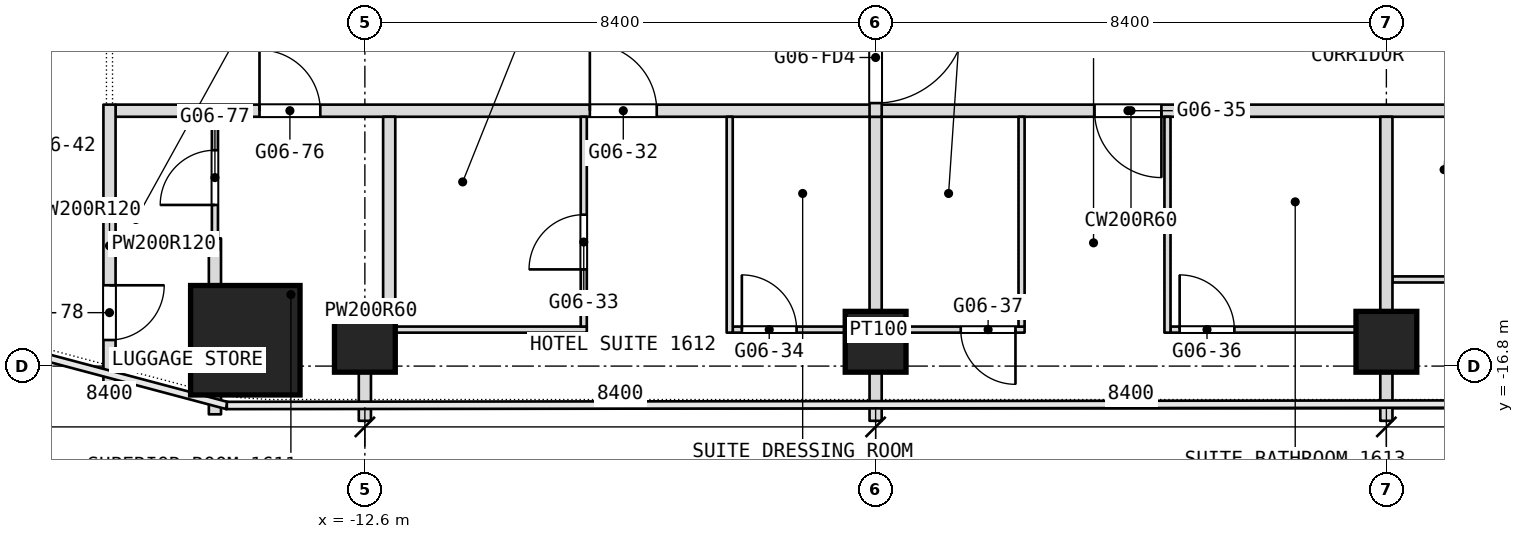
"""IFC4 building model, lengths in metres.
Left out: names, types, materials, properties, quantities, classifications, styles, units other than length and angle.
Written with IfcOpenShell. Run it as: python <this file> out.ifc"""

import sys

from ifc_helpers import new_model, si_unit, direction, frame, frame_2d, origin, origin_2d, place, context, subcontext, project, spatial, rectangle, extrude, element, fill, save


model = new_model("IFC4")
c1 = context("Model", 3, precision=1e-05, world=origin(), true_north=direction((0.0, 1.0)))
c2 = subcontext(c1, "Body", "Model", "MODEL_VIEW")
j1 = project(units=[si_unit("LENGTHUNIT", "METRE"), si_unit("PLANEANGLEUNIT", "RADIAN")], contexts=[c1])
p1 = place(None, origin())
s1 = spatial("IfcSite", under=j1, at=p1, CompositionType="ELEMENT")
p2 = place(p1, origin())
s2 = spatial("IfcBuilding", under=s1, at=p2, CompositionType="ELEMENT")
p3 = place(p2, frame((0.0, 0.0, 72.5)))
s3 = spatial("IfcBuildingStorey", under=s2, at=p3, CompositionType="ELEMENT", Elevation=72.5)
p4 = place(p3, frame((-14.566, -16.375, 0.0), z_axis=(0.0, 0.0, 1.0), x_axis=(1.0, 0.0, 0.0)))
e1 = element("IfcColumn", 1, at=p4, inside=s3, PredefinedType="COLUMN", context=c2, shape_type="SweptSolid", body=[
    extrude(rectangle(XDim=1.8, YDim=1.8, at=origin_2d()), origin(), (0.0, 0.0, 1.0), 3.6),
])
for number, where, z_axis, x_axis in (
    (2, (4.2, -16.4, 0.0), (0.0, 0.0, 1.0), (1.0, 0.0, 0.0)),
    (3, (-4.2, -16.4, 0.0), (0.0, 0.0, 1.0), (1.0, 0.0, 0.0)),
    (4, (-12.6, -16.4, 0.0), (0.0, 0.0, 1.0), (1.0, 0.0, 0.0)),
):
    element("IfcColumn", number, at=place(p3, frame(where, z_axis=z_axis, x_axis=x_axis)), inside=s3, PredefinedType="COLUMN", context=c2, shape_type="SweptSolid", body=[
        extrude(rectangle(XDim=1.0, YDim=1.0, at=origin_2d()), origin(), (0.0, 0.0, 1.0), 3.6),
    ])
p5 = place(p3, frame((-12.5, -16.2, 0.0), z_axis=(0.0, 0.0, 1.0), x_axis=(1.0, 0.0, 0.0)))
e5 = element("IfcWall", 5, at=p5, inside=s3, PredefinedType="PARTITIONING", context=c2, shape_type="SweptSolid", body=[
    extrude(rectangle(XDim=3.55, YDim=0.1, at=frame_2d((1.775, 0.0))), origin(), (0.0, 0.0, 1.0), 2.94),
])
p6 = place(p3, frame((-6.55, -16.2, 0.0), z_axis=(0.0, 0.0, 1.0), x_axis=(1.0, 0.0, 0.0)))
e6 = element("IfcWall", 6, at=p6, inside=s3, PredefinedType="PARTITIONING", context=c2, shape_type="SweptSolid", body=[
    extrude(rectangle(XDim=4.8, YDim=0.1, at=frame_2d((2.4, 0.0))), origin(), (0.0, 0.0, 1.0), 2.94),
])
p7 = place(p6, frame((0.15, 0.0, 0.0)))
e7 = element("IfcOpeningElement", 7, at=p7, cuts=e6, PredefinedType="OPENING", context=c2, shape_type="SweptSolid", body=[
    extrude(rectangle(XDim=0.9, YDim=2.1, at=frame_2d((0.45, 1.05))), frame((0.0, 0.05, 0.0), z_axis=(0.0, -1.0, 0.0), x_axis=(1.0, 0.0, 0.0)), (0.0, 0.0, 1.0), 0.1),
])
p8 = place(p6, frame((3.75, 0.0, 0.0)))
e8 = element("IfcOpeningElement", 8, at=p8, cuts=e6, PredefinedType="OPENING", context=c2, shape_type="SweptSolid", body=[
    extrude(rectangle(XDim=0.9, YDim=2.1, at=frame_2d((0.45, 1.05))), frame((0.0, 0.05, 0.0), z_axis=(0.0, -1.0, 0.0), x_axis=(1.0, 0.0, 0.0)), (0.0, 0.0, 1.0), 0.1),
])
p9 = place(p3, frame((0.65, -16.2, 0.0), z_axis=(0.0, 0.0, 1.0), x_axis=(1.0, 0.0, 0.0)))
e9 = element("IfcWall", 9, at=p9, inside=s3, PredefinedType="PARTITIONING", context=c2, shape_type="SweptSolid", body=[
    extrude(rectangle(XDim=3.65, YDim=0.1, at=frame_2d((1.825, 0.0))), origin(), (0.0, 0.0, 1.0), 2.94),
])
p10 = place(p9, frame((0.15, 0.0, 0.0)))
e10 = element("IfcOpeningElement", 10, at=p10, cuts=e9, PredefinedType="OPENING", context=c2, shape_type="SweptSolid", body=[
    extrude(rectangle(XDim=0.9, YDim=2.1, at=frame_2d((0.45, 1.05))), frame((0.0, 0.05, 0.0), z_axis=(0.0, -1.0, 0.0), x_axis=(1.0, 0.0, 0.0)), (0.0, 0.0, 1.0), 0.1),
])
p11 = place(p3, frame((-12.7, -15.9, 0.0), z_axis=(0.0, 0.0, 1.0), x_axis=(1.0, 0.0, 0.0)))
e11 = element("IfcWall", 11, at=p11, inside=s3, PredefinedType="PARTITIONING", context=c2, shape_type="SweptSolid", body=[
    extrude(rectangle(XDim=0.4, YDim=0.2, at=frame_2d((0.2, 0.0))), origin(), (0.0, 0.0, 1.0), 3.34),
])
p12 = place(p3, frame((4.3, -15.375, 0.0), z_axis=(0.0, 0.0, 1.0), x_axis=(1.0, 0.0, 0.0)))
e12 = element("IfcWall", 12, at=p12, inside=s3, PredefinedType="PARTITIONING", context=c2, shape_type="SweptSolid", body=[
    extrude(rectangle(XDim=2.35, YDim=0.1, at=frame_2d((1.175, 0.0))), origin(), (0.0, 0.0, 1.0), 3.34),
])
p13 = place(p12, frame((1.3, 0.0, 0.0)))
e13 = element("IfcOpeningElement", 13, at=p13, cuts=e12, PredefinedType="OPENING", context=c2, shape_type="SweptSolid", body=[
    extrude(rectangle(XDim=0.9, YDim=2.1, at=frame_2d((0.45, 1.05))), frame((0.0, 0.05, 0.0), z_axis=(0.0, -1.0, 0.0), x_axis=(1.0, 0.0, 0.0)), (0.0, 0.0, 1.0), 0.1),
])
p14 = place(p3, frame((-16.7, -14.8, 0.0), z_axis=(0.0, 0.0, 1.0), x_axis=(1.0, 0.0, 0.0)))
e14 = element("IfcWall", 14, at=p14, inside=s3, PredefinedType="PARTITIONING", context=c2, shape_type="SweptSolid", body=[
    extrude(rectangle(XDim=1.584, YDim=0.2, at=frame_2d((0.792, 0.0))), origin(), (0.0, 0.0, 1.0), 3.34),
])
p15 = place(p3, frame((-16.7, -12.6, 0.0), z_axis=(0.0, 0.0, 1.0), x_axis=(1.0, 0.0, 0.0)))
e15 = element("IfcWall", 15, at=p15, inside=s3, PredefinedType="PARTITIONING", context=c2, shape_type="SweptSolid", body=[
    extrude(rectangle(XDim=33.4, YDim=0.2, at=frame_2d((16.7, 0.0))), origin(), (0.0, 0.0, 1.0), 3.34),
])
p16 = place(p15, frame((7.8, 0.0, 0.0)))
e16 = element("IfcOpeningElement", 16, at=p16, cuts=e15, PredefinedType="OPENING", context=c2, shape_type="SweptSolid", body=[
    extrude(rectangle(XDim=1.1, YDim=2.1, at=frame_2d((0.55, 1.05))), frame((0.0, 0.1, 0.0), z_axis=(0.0, -1.0, 0.0), x_axis=(1.0, 0.0, 0.0)), (0.0, 0.0, 1.0), 0.2),
])
p17 = place(p15, frame((16.1, 0.0, 0.0)))
e17 = element("IfcOpeningElement", 17, at=p17, cuts=e15, PredefinedType="OPENING", context=c2, shape_type="SweptSolid", body=[
    extrude(rectangle(XDim=1.1, YDim=2.1, at=frame_2d((0.55, 1.05))), frame((0.0, 0.1, 0.0), z_axis=(0.0, -1.0, 0.0), x_axis=(1.0, 0.0, 0.0)), (0.0, 0.0, 1.0), 0.2),
])
p18 = place(p15, frame((23.7, 0.0, 0.0)))
e18 = element("IfcOpeningElement", 18, at=p18, cuts=e15, PredefinedType="OPENING", context=c2, shape_type="SweptSolid", body=[
    extrude(rectangle(XDim=1.0, YDim=2.1, at=frame_2d((0.5, 1.05))), frame((0.0, 0.1, 0.0), z_axis=(0.0, -1.0, 0.0), x_axis=(1.0, 0.0, 0.0)), (0.0, 0.0, 1.0), 0.2),
])
p19 = place(p15, frame((25.5, 0.0, 0.0)))
e19 = element("IfcOpeningElement", 19, at=p19, cuts=e15, PredefinedType="OPENING", context=c2, shape_type="SweptSolid", body=[
    extrude(rectangle(XDim=1.0, YDim=2.1, at=frame_2d((0.5, 1.05))), frame((0.0, 0.1, 0.0), z_axis=(0.0, -1.0, 0.0), x_axis=(1.0, 0.0, 0.0)), (0.0, 0.0, 1.0), 0.2),
])
p20 = place(p15, frame((2.367, 0.0, 0.0)))
e20 = element("IfcOpeningElement", 20, at=p20, cuts=e15, PredefinedType="OPENING", context=c2, shape_type="SweptSolid", body=[
    extrude(rectangle(XDim=1.0, YDim=2.1, at=frame_2d((0.5, 1.05))), frame((0.0, 0.1, 0.0), z_axis=(0.0, -1.0, 0.0), x_axis=(1.0, 0.0, 0.0)), (0.0, 0.0, 1.0), 0.2),
])
p21 = place(p15, frame((30.083, 0.0, 0.0)))
e21 = element("IfcOpeningElement", 21, at=p21, cuts=e15, PredefinedType="OPENING", context=c2, shape_type="SweptSolid", body=[
    extrude(rectangle(XDim=1.0, YDim=2.1, at=frame_2d((0.5, 1.05))), frame((0.0, 0.1, 0.0), z_axis=(0.0, -1.0, 0.0), x_axis=(1.0, 0.0, 0.0)), (0.0, 0.0, 1.0), 0.2),
])
p22 = place(p3, frame((4.2, -17.7, 0.0), z_axis=(0.0, 0.0, 1.0), x_axis=(0.0, 1.0, 0.0)))
e22 = element("IfcWall", 22, at=p22, inside=s3, PredefinedType="PARTITIONING", context=c2, shape_type="SweptSolid", body=[
    extrude(rectangle(XDim=5.0, YDim=0.2, at=frame_2d((2.5, 0.0))), origin(), (0.0, 0.0, 1.0), 3.34),
])
p23 = place(p3, frame((0.6, -16.25, 0.0), z_axis=(0.0, 0.0, 1.0), x_axis=(0.0, 1.0, 0.0)))
e23 = element("IfcWall", 23, at=p23, inside=s3, PredefinedType="PARTITIONING", context=c2, shape_type="SweptSolid", body=[
    extrude(rectangle(XDim=3.55, YDim=0.1, at=frame_2d((1.775, 0.0))), origin(), (0.0, 0.0, 1.0), 3.34),
])
p24 = place(p3, frame((-1.8, -16.15, 0.0), z_axis=(0.0, 0.0, 1.0), x_axis=(0.0, 1.0, 0.0)))
e24 = element("IfcWall", 24, at=p24, inside=s3, PredefinedType="PARTITIONING", context=c2, shape_type="SweptSolid", body=[
    extrude(rectangle(XDim=3.45, YDim=0.1, at=frame_2d((1.725, 0.0))), origin(), (0.0, 0.0, 1.0), 3.34),
])
p25 = place(p3, frame((-4.2, -17.7, 0.0), z_axis=(0.0, 0.0, 1.0), x_axis=(0.0, 1.0, 0.0)))
e25 = element("IfcWall", 25, at=p25, inside=s3, PredefinedType="PARTITIONING", context=c2, shape_type="SweptSolid", body=[
    extrude(rectangle(XDim=5.0, YDim=0.2, at=frame_2d((2.5, 0.0))), origin(), (0.0, 0.0, 1.0), 3.34),
])
p26 = place(p3, frame((-4.2, -12.7, 0.0), z_axis=(0.0, 0.0, 1.0), x_axis=(0.0, 1.0, 0.0)))
e26 = element("IfcWall", 26, at=p26, inside=s3, PredefinedType="PARTITIONING", context=c2, shape_type="SweptSolid", body=[
    extrude(rectangle(XDim=12.7, YDim=0.2, at=frame_2d((6.35, 0.0))), origin(), (0.0, 0.0, 1.0), 3.34),
])
p27 = place(p26, frame((11.05, 0.0, 0.0)))
e27 = element("IfcOpeningElement", 27, at=p27, cuts=e26, PredefinedType="OPENING", context=c2, shape_type="SweptSolid", body=[
    extrude(rectangle(XDim=1.5, YDim=2.1, at=frame_2d((0.75, 1.05))), frame((0.0, 0.1, 0.0), z_axis=(0.0, -1.0, 0.0), x_axis=(1.0, 0.0, 0.0)), (0.0, 0.0, 1.0), 0.2),
])
p28 = place(p26, frame((0.225, 0.0, 0.0)))
e28 = element("IfcOpeningElement", 28, at=p28, cuts=e26, PredefinedType="OPENING", context=c2, shape_type="SweptSolid", body=[
    extrude(rectangle(XDim=1.5, YDim=2.1, at=frame_2d((0.75, 1.05))), frame((0.0, 0.1, 0.0), z_axis=(0.0, -1.0, 0.0), x_axis=(1.0, 0.0, 0.0)), (0.0, 0.0, 1.0), 0.2),
])
p29 = place(p3, frame((-6.6, -16.25, 0.0), z_axis=(0.0, 0.0, 1.0), x_axis=(0.0, 1.0, 0.0)))
e29 = element("IfcWall", 29, at=p29, inside=s3, PredefinedType="PARTITIONING", context=c2, shape_type="SweptSolid", body=[
    extrude(rectangle(XDim=3.55, YDim=0.1, at=frame_2d((1.775, 0.0))), origin(), (0.0, 0.0, 1.0), 3.34),
])
p30 = place(p3, frame((-9.0, -16.15, 0.0), z_axis=(0.0, 0.0, 1.0), x_axis=(0.0, 1.0, 0.0)))
e30 = element("IfcWall", 30, at=p30, inside=s3, PredefinedType="PARTITIONING", context=c2, shape_type="SweptSolid", body=[
    extrude(rectangle(XDim=3.45, YDim=0.1, at=frame_2d((1.725, 0.0))), origin(), (0.0, 0.0, 1.0), 3.34),
])
p31 = place(p30, frame((0.94, 0.0, 0.0)))
e31 = element("IfcOpeningElement", 31, at=p31, cuts=e30, PredefinedType="OPENING", context=c2, shape_type="SweptSolid", body=[
    extrude(rectangle(XDim=0.9, YDim=2.1, at=frame_2d((0.45, 1.05))), frame((0.0, 0.05, 0.0), z_axis=(0.0, -1.0, 0.0), x_axis=(1.0, 0.0, 0.0)), (0.0, 0.0, 1.0), 0.1),
])
p32 = place(p3, frame((-12.2, -16.0, 0.0), z_axis=(0.0, 0.0, 1.0), x_axis=(0.0, 1.0, 0.0)))
e32 = element("IfcWall", 32, at=p32, inside=s3, PredefinedType="PARTITIONING", context=c2, shape_type="SweptSolid", body=[
    extrude(rectangle(XDim=3.3, YDim=0.2, at=frame_2d((1.65, 0.0))), origin(), (0.0, 0.0, 1.0), 3.34),
])
p33 = place(p3, frame((-12.6, -17.7, 0.0), z_axis=(0.0, 0.0, 1.0), x_axis=(0.0, 1.0, 0.0)))
e33 = element("IfcWall", 33, at=p33, inside=s3, PredefinedType="PARTITIONING", context=c2, shape_type="SweptSolid", body=[
    extrude(rectangle(XDim=1.7, YDim=0.2, at=frame_2d((0.85, 0.0))), origin(), (0.0, 0.0, 1.0), 3.34),
])
p34 = place(p3, frame((-15.066, -17.593, 0.0), z_axis=(0.0, 0.0, 1.0), x_axis=(0.0, 1.0, 0.0)))
e34 = element("IfcWall", 34, at=p34, inside=s3, PredefinedType="PARTITIONING", context=c2, shape_type="SweptSolid", body=[
    extrude(rectangle(XDim=0.318, YDim=0.2, at=frame_2d((0.159, 0.0))), origin(), (0.0, 0.0, 1.0), 3.34),
])
p35 = place(p3, frame((-15.066, -15.475, 0.0), z_axis=(0.0, 0.0, 1.0), x_axis=(0.0, 1.0, 0.0)))
e35 = element("IfcWall", 35, at=p35, inside=s3, PredefinedType="PARTITIONING", context=c2, shape_type="SweptSolid", body=[
    extrude(rectangle(XDim=0.775, YDim=0.2, at=frame_2d((0.388, 0.0))), origin(), (0.0, 0.0, 1.0), 3.34),
])
p36 = place(p3, frame((-15.066, -14.9, 0.0), z_axis=(0.0, 0.0, 1.0), x_axis=(0.0, 1.0, 0.0)))
e36 = element("IfcWall", 36, at=p36, inside=s3, PredefinedType="PARTITIONING", context=c2, shape_type="SweptSolid", body=[
    extrude(rectangle(XDim=2.2, YDim=0.1, at=frame_2d((1.1, 0.0))), origin(), (0.0, 0.0, 1.0), 3.34),
])
p37 = place(p36, frame((0.75, 0.0, 0.0)))
e37 = element("IfcOpeningElement", 37, at=p37, cuts=e36, PredefinedType="OPENING", context=c2, shape_type="SweptSolid", body=[
    extrude(rectangle(XDim=0.9, YDim=2.1, at=frame_2d((0.45, 1.05))), frame((0.0, 0.05, 0.0), z_axis=(0.0, -1.0, 0.0), x_axis=(1.0, 0.0, 0.0)), (0.0, 0.0, 1.0), 0.1),
])
p38 = place(p3, frame((-16.8, -17.143, 0.0), z_axis=(0.0, 0.0, 1.0), x_axis=(0.0, 1.0, 0.0)))
e38 = element("IfcWall", 38, at=p38, inside=s3, PredefinedType="PARTITIONING", context=c2, shape_type="SweptSolid", body=[
    extrude(rectangle(XDim=4.643, YDim=0.2, at=frame_2d((2.322, 0.0))), origin(), (0.0, 0.0, 1.0), 3.34),
])
p39 = place(p38, frame((0.772, 0.0, 0.0)))
e39 = element("IfcOpeningElement", 39, at=p39, cuts=e38, PredefinedType="OPENING", context=c2, shape_type="SweptSolid", body=[
    extrude(rectangle(XDim=0.9, YDim=2.1, at=frame_2d((0.45, 1.05))), frame((0.0, 0.1, 0.0), z_axis=(0.0, -1.0, 0.0), x_axis=(1.0, 0.0, 0.0)), (0.0, 0.0, 1.0), 0.2),
])
p40 = place(p7, origin())
e40 = element("IfcDoor", 40, at=p40, inside=s3, OperationType="SINGLE_SWING_LEFT", PredefinedType="DOOR", context=c2, shape_type="SweptSolid", body=[
    extrude(rectangle(XDim=0.9, YDim=2.1, at=frame_2d((0.45, 1.05))), frame((0.0, 0.025, 0.0), z_axis=(0.0, -1.0, 0.0), x_axis=(1.0, 0.0, 0.0)), (0.0, 0.0, 1.0), 0.05),
])
fill(e7, e40)
p41 = place(p8, origin())
e41 = element("IfcDoor", 41, at=p41, inside=s3, OperationType="SINGLE_SWING_RIGHT", PredefinedType="DOOR", context=c2, shape_type="SweptSolid", body=[
    extrude(rectangle(XDim=0.9, YDim=2.1, at=frame_2d((0.45, 1.05))), frame((0.0, 0.025, 0.0), z_axis=(0.0, -1.0, 0.0), x_axis=(1.0, 0.0, 0.0)), (0.0, 0.0, 1.0), 0.05),
])
fill(e8, e41)
p42 = place(p10, origin())
e42 = element("IfcDoor", 42, at=p42, inside=s3, OperationType="SINGLE_SWING_LEFT", PredefinedType="DOOR", context=c2, shape_type="SweptSolid", body=[
    extrude(rectangle(XDim=0.9, YDim=2.1, at=frame_2d((0.45, 1.05))), frame((0.0, 0.025, 0.0), z_axis=(0.0, -1.0, 0.0), x_axis=(1.0, 0.0, 0.0)), (0.0, 0.0, 1.0), 0.05),
])
fill(e10, e42)
p43 = place(p16, origin())
e43 = element("IfcDoor", 43, at=p43, inside=s3, OperationType="SINGLE_SWING_RIGHT", PredefinedType="DOOR", context=c2, shape_type="SweptSolid", body=[
    extrude(rectangle(XDim=1.1, YDim=2.1, at=frame_2d((0.55, 1.05))), frame((0.0, 0.025, 0.0), z_axis=(0.0, -1.0, 0.0), x_axis=(1.0, 0.0, 0.0)), (0.0, 0.0, 1.0), 0.05),
])
fill(e16, e43)
p44 = place(p17, origin())
e44 = element("IfcDoor", 44, at=p44, inside=s3, OperationType="SINGLE_SWING_LEFT", PredefinedType="DOOR", context=c2, shape_type="SweptSolid", body=[
    extrude(rectangle(XDim=1.1, YDim=2.1, at=frame_2d((0.55, 1.05))), frame((0.0, 0.025, 0.0), z_axis=(0.0, -1.0, 0.0), x_axis=(1.0, 0.0, 0.0)), (0.0, 0.0, 1.0), 0.05),
])
fill(e17, e44)
p45 = place(p20, origin())
e45 = element("IfcDoor", 45, at=p45, inside=s3, OperationType="SINGLE_SWING_RIGHT", PredefinedType="DOOR", context=c2, shape_type="SweptSolid", body=[
    extrude(rectangle(XDim=1.0, YDim=2.1, at=frame_2d((0.5, 1.05))), frame((0.0, 0.025, 0.0), z_axis=(0.0, -1.0, 0.0), x_axis=(1.0, 0.0, 0.0)), (0.0, 0.0, 1.0), 0.05),
])
fill(e20, e45)
p46 = place(p31, origin())
e46 = element("IfcDoor", 46, at=p46, inside=s3, OperationType="SINGLE_SWING_LEFT", PredefinedType="DOOR", context=c2, shape_type="SweptSolid", body=[
    extrude(rectangle(XDim=0.9, YDim=2.1, at=frame_2d((0.45, 1.05))), frame((0.0, 0.025, 0.0), z_axis=(0.0, -1.0, 0.0), x_axis=(1.0, 0.0, 0.0)), (0.0, 0.0, 1.0), 0.05),
])
fill(e31, e46)
p47 = place(p37, origin())
e47 = element("IfcDoor", 47, at=p47, inside=s3, OperationType="SINGLE_SWING_RIGHT", PredefinedType="DOOR", context=c2, shape_type="SweptSolid", body=[
    extrude(rectangle(XDim=0.9, YDim=2.1, at=frame_2d((0.45, 1.05))), frame((0.0, 0.025, 0.0), z_axis=(0.0, -1.0, 0.0), x_axis=(1.0, 0.0, 0.0)), (0.0, 0.0, 1.0), 0.05),
])
fill(e37, e47)
p48 = place(p39, origin())
e48 = element("IfcDoor", 48, at=p48, inside=s3, OperationType="SINGLE_SWING_LEFT", PredefinedType="DOOR", context=c2, shape_type="SweptSolid", body=[
    extrude(rectangle(XDim=0.9, YDim=2.1, at=frame_2d((0.45, 1.05))), frame((0.0, 0.025, 0.0), z_axis=(0.0, -1.0, 0.0), x_axis=(1.0, 0.0, 0.0)), (0.0, 0.0, 1.0), 0.05),
])
fill(e39, e48)
p49 = place(p28, origin())
e49 = element("IfcDoor", 49, at=p49, inside=s3, OperationType="DOUBLE_DOOR_DOUBLE_SWING", PredefinedType="DOOR", context=c2, shape_type="SweptSolid", body=[
    extrude(rectangle(XDim=1.5, YDim=2.1, at=frame_2d((0.75, 1.05))), frame((0.0, 0.025, 0.0), z_axis=(0.0, -1.0, 0.0), x_axis=(1.0, 0.0, 0.0)), (0.0, 0.0, 1.0), 0.05),
])
fill(e28, e49)
save(model, sys.argv[1])
